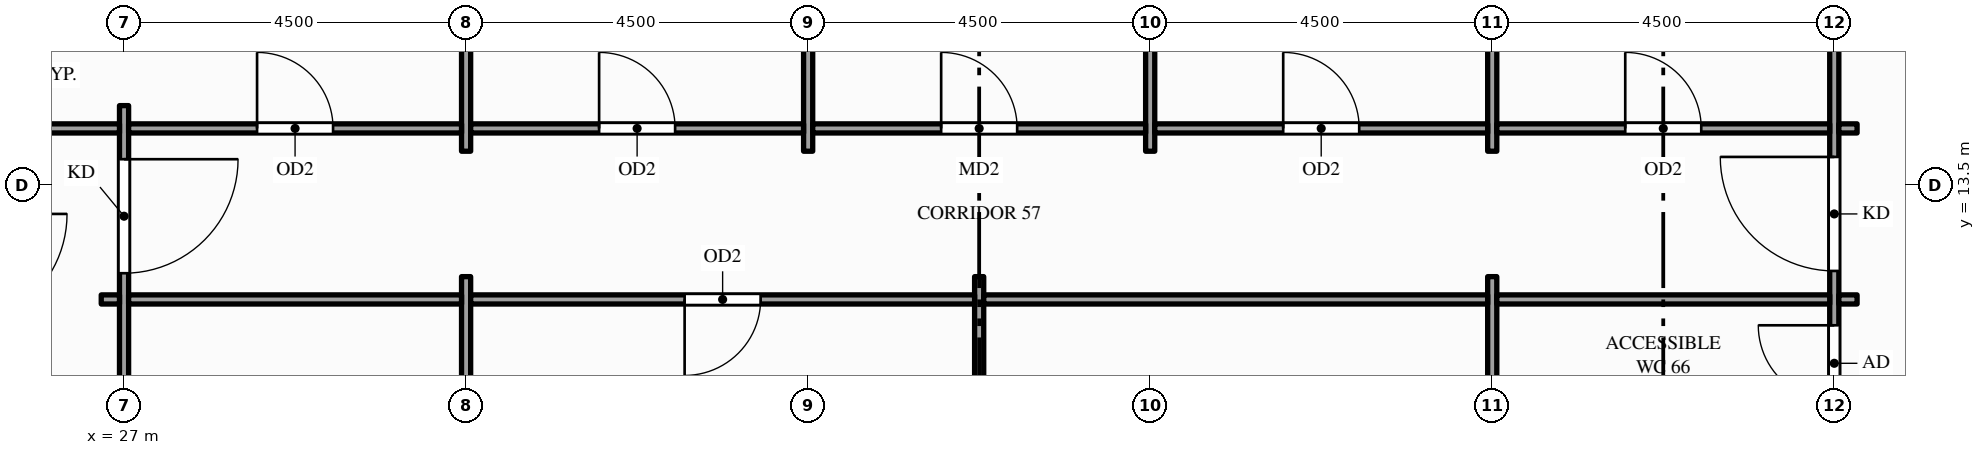
"""IFC4 building model, lengths in metres.
Left out: names, types, materials, properties, quantities, classifications, styles, units other than length and angle.
Written with IfcOpenShell. Run it as: python <this file> out.ifc"""

import sys

from ifc_helpers import new_model, si_unit, direction, frame, frame_2d, origin, place, context, subcontext, project, spatial, rectangle, extrude, element, fill, save


model = new_model("IFC4")
c1 = context("Model", 3, precision=1e-05, world=origin(), true_north=direction((0.0, 1.0)))
c2 = subcontext(c1, "Body", "Model", "MODEL_VIEW")
j1 = project(units=[si_unit("LENGTHUNIT", "METRE"), si_unit("PLANEANGLEUNIT", "RADIAN")], contexts=[c1])
p1 = place(None, origin())
s1 = spatial("IfcSite", under=j1, at=p1, CompositionType="ELEMENT")
p2 = place(p1, origin())
s2 = spatial("IfcBuilding", under=s1, at=p2, CompositionType="ELEMENT")
p3 = place(p2, frame((0.0, 0.0, 235.0)))
s3 = spatial("IfcBuildingStorey", under=s2, at=p3, CompositionType="ELEMENT", Elevation=235.0)
p4 = place(p3, frame((27.0, 4.95, 0.0), z_axis=(0.0, 0.0, 1.0), x_axis=(0.0, 1.0, 0.0)))
e1 = element("IfcWall", 1, at=p4, inside=s3, PredefinedType="PARTITIONING", context=c2, shape_type="SweptSolid", body=[
    extrude(rectangle(XDim=9.6, YDim=0.12, at=frame_2d((4.8, 0.0))), origin(), (0.0, 0.0, 1.0), 2.87),
])
p5 = place(p4, frame((0.705, 0.0, 0.0)))
e2 = element("IfcOpeningElement", 2, at=p5, cuts=e1, PredefinedType="OPENING", context=c2, shape_type="SweptSolid", body=[
    extrude(rectangle(XDim=1.5, YDim=2.1, at=frame_2d((0.75, 1.05))), frame((0.0, 0.07, 0.0), z_axis=(0.0, -1.0, 0.0), x_axis=(1.0, 0.0, 0.0)), (0.0, 0.0, 1.0), 0.14),
])
p6 = place(p4, frame((7.395, 0.0, 0.0)))
e3 = element("IfcOpeningElement", 3, at=p6, cuts=e1, PredefinedType="OPENING", context=c2, shape_type="SweptSolid", body=[
    extrude(rectangle(XDim=1.5, YDim=2.1, at=frame_2d((0.75, 1.05))), frame((0.0, 0.07, 0.0), z_axis=(0.0, -1.0, 0.0), x_axis=(1.0, 0.0, 0.0)), (0.0, 0.0, 1.0), 0.14),
])
p7 = place(p3, frame((31.5, 7.2, 0.0), z_axis=(0.0, 0.0, 1.0), x_axis=(0.0, 1.0, 0.0)))
e4 = element("IfcWall", 4, at=p7, inside=s3, PredefinedType="PARTITIONING", context=c2, shape_type="SweptSolid", body=[
    extrude(rectangle(XDim=5.1, YDim=0.12, at=frame_2d((2.55, 0.0))), origin(), (0.0, 0.0, 1.0), 2.87),
])
for number, where, z_axis, x_axis in (
    (5, (31.5, 13.95, 0.0), (0.0, 0.0, 1.0), (0.0, 1.0, 0.0)),
    (6, (36.0, 13.95, 0.0), (0.0, 0.0, 1.0), (0.0, 1.0, 0.0)),
):
    element("IfcWall", number, at=place(p3, frame(where, z_axis=z_axis, x_axis=x_axis)), inside=s3, PredefinedType="PARTITIONING", context=c2, shape_type="SweptSolid", body=[
        extrude(rectangle(XDim=6.9, YDim=0.12, at=frame_2d((3.45, 0.0))), origin(), (0.0, 0.0, 1.0), 2.87),
    ])
p8 = place(p3, frame((38.25, 7.2, 0.0), z_axis=(0.0, 0.0, 1.0), x_axis=(0.0, 1.0, 0.0)))
e7 = element("IfcWall", 7, at=p8, inside=s3, PredefinedType="PARTITIONING", context=c2, shape_type="SweptSolid", body=[
    extrude(rectangle(XDim=5.1, YDim=0.12, at=frame_2d((2.55, 0.0))), origin(), (0.0, 0.0, 1.0), 2.87),
])
p9 = place(p3, frame((40.5, 13.95, 0.0), z_axis=(0.0, 0.0, 1.0), x_axis=(0.0, 1.0, 0.0)))
e8 = element("IfcWall", 8, at=p9, inside=s3, PredefinedType="PARTITIONING", context=c2, shape_type="SweptSolid", body=[
    extrude(rectangle(XDim=6.9, YDim=0.12, at=frame_2d((3.45, 0.0))), origin(), (0.0, 0.0, 1.0), 2.87),
])
p10 = place(p3, frame((45.0, 7.2, 0.0), z_axis=(0.0, 0.0, 1.0), x_axis=(0.0, 1.0, 0.0)))
e9 = element("IfcWall", 9, at=p10, inside=s3, PredefinedType="PARTITIONING", context=c2, shape_type="SweptSolid", body=[
    extrude(rectangle(XDim=5.1, YDim=0.12, at=frame_2d((2.55, 0.0))), origin(), (0.0, 0.0, 1.0), 2.87),
])
p11 = place(p3, frame((45.0, 13.95, 0.0), z_axis=(0.0, 0.0, 1.0), x_axis=(0.0, 1.0, 0.0)))
e10 = element("IfcWall", 10, at=p11, inside=s3, PredefinedType="PARTITIONING", context=c2, shape_type="SweptSolid", body=[
    extrude(rectangle(XDim=6.9, YDim=0.12, at=frame_2d((3.45, 0.0))), origin(), (0.0, 0.0, 1.0), 2.87),
])
p12 = place(p3, frame((49.5, -1.35, 0.0), z_axis=(0.0, 0.0, 1.0), x_axis=(0.0, 1.0, 0.0)))
e11 = element("IfcWall", 11, at=p12, inside=s3, PredefinedType="PARTITIONING", context=c2, shape_type="SweptSolid", body=[
    extrude(rectangle(XDim=22.2, YDim=0.12, at=frame_2d((11.1, 0.0))), origin(), (0.0, 0.0, 1.0), 2.87),
])
p13 = place(p12, frame((6.975, 0.0, 0.0)))
e12 = element("IfcOpeningElement", 12, at=p13, cuts=e11, PredefinedType="OPENING", context=c2, shape_type="SweptSolid", body=[
    extrude(rectangle(XDim=1.5, YDim=2.1, at=frame_2d((0.75, 1.05))), frame((0.0, 0.07, 0.0), z_axis=(0.0, -1.0, 0.0), x_axis=(1.0, 0.0, 0.0)), (0.0, 0.0, 1.0), 0.14),
])
p14 = place(p12, frame((13.725, 0.0, 0.0)))
e13 = element("IfcOpeningElement", 13, at=p14, cuts=e11, PredefinedType="OPENING", context=c2, shape_type="SweptSolid", body=[
    extrude(rectangle(XDim=1.5, YDim=2.1, at=frame_2d((0.75, 1.05))), frame((0.0, 0.07, 0.0), z_axis=(0.0, -1.0, 0.0), x_axis=(1.0, 0.0, 0.0)), (0.0, 0.0, 1.0), 0.14),
])
p15 = place(p12, frame((9.29, 0.0, 0.0)))
e14 = element("IfcOpeningElement", 14, at=p15, cuts=e11, PredefinedType="OPENING", context=c2, shape_type="SweptSolid", body=[
    extrude(rectangle(XDim=0.9, YDim=2.1, at=frame_2d((0.45, 1.05))), frame((0.0, 0.07, 0.0), z_axis=(0.0, -1.0, 0.0), x_axis=(1.0, 0.0, 0.0)), (0.0, 0.0, 1.0), 0.14),
])
p16 = place(p12, frame((10.65, 0.0, 0.0)))
e15 = element("IfcOpeningElement", 15, at=p16, cuts=e11, PredefinedType="OPENING", context=c2, shape_type="SweptSolid", body=[
    extrude(rectangle(XDim=0.9, YDim=2.1, at=frame_2d((0.45, 1.05))), frame((0.0, 0.07, 0.0), z_axis=(0.0, -1.0, 0.0), x_axis=(1.0, 0.0, 0.0)), (0.0, 0.0, 1.0), 0.14),
])
p17 = place(p12, frame((12.01, 0.0, 0.0)))
e16 = element("IfcOpeningElement", 16, at=p17, cuts=e11, PredefinedType="OPENING", context=c2, shape_type="SweptSolid", body=[
    extrude(rectangle(XDim=1.0, YDim=2.1, at=frame_2d((0.5, 1.05))), frame((0.0, 0.07, 0.0), z_axis=(0.0, -1.0, 0.0), x_axis=(1.0, 0.0, 0.0)), (0.0, 0.0, 1.0), 0.14),
])
p18 = place(p3, frame((26.7, 12.0, 0.0), z_axis=(0.0, 0.0, 1.0), x_axis=(1.0, 0.0, 0.0)))
e17 = element("IfcWall", 17, at=p18, inside=s3, PredefinedType="PARTITIONING", context=c2, shape_type="SweptSolid", body=[
    extrude(rectangle(XDim=0.24, YDim=0.12, at=frame_2d((0.12, 0.0))), origin(), (0.0, 0.0, 1.0), 2.87),
])
p19 = place(p3, frame((27.06, 12.0, 0.0), z_axis=(0.0, 0.0, 1.0), x_axis=(1.0, 0.0, 0.0)))
e18 = element("IfcWall", 18, at=p19, inside=s3, PredefinedType="PARTITIONING", context=c2, shape_type="SweptSolid", body=[
    extrude(rectangle(XDim=4.38, YDim=0.12, at=frame_2d((2.19, 0.0))), origin(), (0.0, 0.0, 1.0), 2.87),
])
p20 = place(p3, frame((31.56, 12.0, 0.0), z_axis=(0.0, 0.0, 1.0), x_axis=(1.0, 0.0, 0.0)))
e19 = element("IfcWall", 19, at=p20, inside=s3, PredefinedType="PARTITIONING", context=c2, shape_type="SweptSolid", body=[
    extrude(rectangle(XDim=6.63, YDim=0.12, at=frame_2d((3.315, 0.0))), origin(), (0.0, 0.0, 1.0), 2.87),
])
p21 = place(p20, frame((2.815, 0.0, 0.0)))
e20 = element("IfcOpeningElement", 20, at=p21, cuts=e19, PredefinedType="OPENING", context=c2, shape_type="SweptSolid", body=[
    extrude(rectangle(XDim=1.0, YDim=2.1, at=frame_2d((0.5, 1.05))), frame((0.0, 0.07, 0.0), z_axis=(0.0, -1.0, 0.0), x_axis=(1.0, 0.0, 0.0)), (0.0, 0.0, 1.0), 0.14),
])
p22 = place(p3, frame((38.31, 12.0, 0.0), z_axis=(0.0, 0.0, 1.0), x_axis=(1.0, 0.0, 0.0)))
e21 = element("IfcWall", 21, at=p22, inside=s3, PredefinedType="PARTITIONING", context=c2, shape_type="SweptSolid", body=[
    extrude(rectangle(XDim=6.63, YDim=0.12, at=frame_2d((3.315, 0.0))), origin(), (0.0, 0.0, 1.0), 2.87),
])
p23 = place(p3, frame((45.06, 12.0, 0.0), z_axis=(0.0, 0.0, 1.0), x_axis=(1.0, 0.0, 0.0)))
e22 = element("IfcWall", 22, at=p23, inside=s3, PredefinedType="PARTITIONING", context=c2, shape_type="SweptSolid", body=[
    extrude(rectangle(XDim=4.38, YDim=0.12, at=frame_2d((2.19, 0.0))), origin(), (0.0, 0.0, 1.0), 2.87),
])
p24 = place(p3, frame((49.56, 12.0, 0.0), z_axis=(0.0, 0.0, 1.0), x_axis=(1.0, 0.0, 0.0)))
e23 = element("IfcWall", 23, at=p24, inside=s3, PredefinedType="PARTITIONING", context=c2, shape_type="SweptSolid", body=[
    extrude(rectangle(XDim=0.24, YDim=0.12, at=frame_2d((0.12, 0.0))), origin(), (0.0, 0.0, 1.0), 2.87),
])
p25 = place(p3, frame((24.81, 14.25, 0.0), z_axis=(0.0, 0.0, 1.0), x_axis=(1.0, 0.0, 0.0)))
e24 = element("IfcWall", 24, at=p25, inside=s3, PredefinedType="PARTITIONING", context=c2, shape_type="SweptSolid", body=[
    extrude(rectangle(XDim=2.13, YDim=0.12, at=frame_2d((1.065, 0.0))), origin(), (0.0, 0.0, 1.0), 2.76),
])
p26 = place(p3, frame((27.06, 14.25, 0.0), z_axis=(0.0, 0.0, 1.0), x_axis=(1.0, 0.0, 0.0)))
e25 = element("IfcWall", 25, at=p26, inside=s3, PredefinedType="PARTITIONING", context=c2, shape_type="SweptSolid", body=[
    extrude(rectangle(XDim=4.38, YDim=0.12, at=frame_2d((2.19, 0.0))), origin(), (0.0, 0.0, 1.0), 2.87),
])
p27 = place(p26, frame((1.69, 0.0, 0.0)))
e26 = element("IfcOpeningElement", 26, at=p27, cuts=e25, PredefinedType="OPENING", context=c2, shape_type="SweptSolid", body=[
    extrude(rectangle(XDim=1.0, YDim=2.1, at=frame_2d((0.5, 1.05))), frame((0.0, 0.07, 0.0), z_axis=(0.0, -1.0, 0.0), x_axis=(1.0, 0.0, 0.0)), (0.0, 0.0, 1.0), 0.14),
])
p28 = place(p3, frame((31.56, 14.25, 0.0), z_axis=(0.0, 0.0, 1.0), x_axis=(1.0, 0.0, 0.0)))
e27 = element("IfcWall", 27, at=p28, inside=s3, PredefinedType="PARTITIONING", context=c2, shape_type="SweptSolid", body=[
    extrude(rectangle(XDim=4.38, YDim=0.12, at=frame_2d((2.19, 0.0))), origin(), (0.0, 0.0, 1.0), 2.87),
])
p29 = place(p28, frame((1.69, 0.0, 0.0)))
e28 = element("IfcOpeningElement", 28, at=p29, cuts=e27, PredefinedType="OPENING", context=c2, shape_type="SweptSolid", body=[
    extrude(rectangle(XDim=1.0, YDim=2.1, at=frame_2d((0.5, 1.05))), frame((0.0, 0.07, 0.0), z_axis=(0.0, -1.0, 0.0), x_axis=(1.0, 0.0, 0.0)), (0.0, 0.0, 1.0), 0.14),
])
p30 = place(p3, frame((36.06, 14.25, 0.0), z_axis=(0.0, 0.0, 1.0), x_axis=(1.0, 0.0, 0.0)))
e29 = element("IfcWall", 29, at=p30, inside=s3, PredefinedType="PARTITIONING", context=c2, shape_type="SweptSolid", body=[
    extrude(rectangle(XDim=4.38, YDim=0.12, at=frame_2d((2.19, 0.0))), origin(), (0.0, 0.0, 1.0), 2.87),
])
p31 = place(p30, frame((1.69, 0.0, 0.0)))
e30 = element("IfcOpeningElement", 30, at=p31, cuts=e29, PredefinedType="OPENING", context=c2, shape_type="SweptSolid", body=[
    extrude(rectangle(XDim=1.0, YDim=2.1, at=frame_2d((0.5, 1.05))), frame((0.0, 0.07, 0.0), z_axis=(0.0, -1.0, 0.0), x_axis=(1.0, 0.0, 0.0)), (0.0, 0.0, 1.0), 0.14),
])
p32 = place(p3, frame((40.56, 14.25, 0.0), z_axis=(0.0, 0.0, 1.0), x_axis=(1.0, 0.0, 0.0)))
e31 = element("IfcWall", 31, at=p32, inside=s3, PredefinedType="PARTITIONING", context=c2, shape_type="SweptSolid", body=[
    extrude(rectangle(XDim=4.38, YDim=0.12, at=frame_2d((2.19, 0.0))), origin(), (0.0, 0.0, 1.0), 2.87),
])
p33 = place(p32, frame((1.69, 0.0, 0.0)))
e32 = element("IfcOpeningElement", 32, at=p33, cuts=e31, PredefinedType="OPENING", context=c2, shape_type="SweptSolid", body=[
    extrude(rectangle(XDim=1.0, YDim=2.1, at=frame_2d((0.5, 1.05))), frame((0.0, 0.07, 0.0), z_axis=(0.0, -1.0, 0.0), x_axis=(1.0, 0.0, 0.0)), (0.0, 0.0, 1.0), 0.14),
])
p34 = place(p3, frame((45.06, 14.25, 0.0), z_axis=(0.0, 0.0, 1.0), x_axis=(1.0, 0.0, 0.0)))
e33 = element("IfcWall", 33, at=p34, inside=s3, PredefinedType="PARTITIONING", context=c2, shape_type="SweptSolid", body=[
    extrude(rectangle(XDim=4.38, YDim=0.12, at=frame_2d((2.19, 0.0))), origin(), (0.0, 0.0, 1.0), 2.87),
])
p35 = place(p34, frame((1.69, 0.0, 0.0)))
e34 = element("IfcOpeningElement", 34, at=p35, cuts=e33, PredefinedType="OPENING", context=c2, shape_type="SweptSolid", body=[
    extrude(rectangle(XDim=1.0, YDim=2.1, at=frame_2d((0.5, 1.05))), frame((0.0, 0.07, 0.0), z_axis=(0.0, -1.0, 0.0), x_axis=(1.0, 0.0, 0.0)), (0.0, 0.0, 1.0), 0.14),
])
p36 = place(p3, frame((49.56, 14.25, 0.0), z_axis=(0.0, 0.0, 1.0), x_axis=(1.0, 0.0, 0.0)))
e35 = element("IfcWall", 35, at=p36, inside=s3, PredefinedType="PARTITIONING", context=c2, shape_type="SweptSolid", body=[
    extrude(rectangle(XDim=0.24, YDim=0.12, at=frame_2d((0.12, 0.0))), origin(), (0.0, 0.0, 1.0), 2.87),
])
p37 = place(p6, origin())
e36 = element("IfcDoor", 36, at=p37, inside=s3, OperationType="SINGLE_SWING_RIGHT", PredefinedType="DOOR", context=c2, shape_type="SweptSolid", body=[
    extrude(rectangle(XDim=1.5, YDim=2.1, at=frame_2d((0.75, 1.05))), frame((0.0, 0.025, 0.0), z_axis=(0.0, -1.0, 0.0), x_axis=(1.0, 0.0, 0.0)), (0.0, 0.0, 1.0), 0.05),
])
fill(e3, e36)
p38 = place(p14, origin())
e37 = element("IfcDoor", 37, at=p38, inside=s3, OperationType="SINGLE_SWING_RIGHT", PredefinedType="DOOR", context=c2, shape_type="SweptSolid", body=[
    extrude(rectangle(XDim=1.5, YDim=2.1, at=frame_2d((0.75, 1.05))), frame((0.0, 0.025, 0.0), z_axis=(0.0, -1.0, 0.0), x_axis=(1.0, 0.0, 0.0)), (0.0, 0.0, 1.0), 0.05),
])
fill(e13, e37)
p39 = place(p21, origin())
e38 = element("IfcDoor", 38, at=p39, inside=s3, OperationType="SINGLE_SWING_LEFT", PredefinedType="DOOR", context=c2, shape_type="SweptSolid", body=[
    extrude(rectangle(XDim=1.0, YDim=2.1, at=frame_2d((0.5, 1.05))), frame((0.0, 0.025, 0.0), z_axis=(0.0, -1.0, 0.0), x_axis=(1.0, 0.0, 0.0)), (0.0, 0.0, 1.0), 0.05),
])
fill(e20, e38)
p40 = place(p17, origin())
e39 = element("IfcDoor", 39, at=p40, inside=s3, OperationType="SINGLE_SWING_RIGHT", PredefinedType="DOOR", context=c2, shape_type="SweptSolid", body=[
    extrude(rectangle(XDim=1.0, YDim=2.1, at=frame_2d((0.5, 1.05))), frame((0.0, 0.025, 0.0), z_axis=(0.0, -1.0, 0.0), x_axis=(1.0, 0.0, 0.0)), (0.0, 0.0, 1.0), 0.05),
])
fill(e16, e39)
p41 = place(p27, origin())
e40 = element("IfcDoor", 40, at=p41, inside=s3, OperationType="SINGLE_SWING_LEFT", PredefinedType="DOOR", context=c2, shape_type="SweptSolid", body=[
    extrude(rectangle(XDim=1.0, YDim=2.1, at=frame_2d((0.5, 1.05))), frame((0.0, 0.025, 0.0), z_axis=(0.0, -1.0, 0.0), x_axis=(1.0, 0.0, 0.0)), (0.0, 0.0, 1.0), 0.05),
])
fill(e26, e40)
p42 = place(p29, origin())
e41 = element("IfcDoor", 41, at=p42, inside=s3, OperationType="SINGLE_SWING_LEFT", PredefinedType="DOOR", context=c2, shape_type="SweptSolid", body=[
    extrude(rectangle(XDim=1.0, YDim=2.1, at=frame_2d((0.5, 1.05))), frame((0.0, 0.025, 0.0), z_axis=(0.0, -1.0, 0.0), x_axis=(1.0, 0.0, 0.0)), (0.0, 0.0, 1.0), 0.05),
])
fill(e28, e41)
p43 = place(p31, origin())
e42 = element("IfcDoor", 42, at=p43, inside=s3, OperationType="SINGLE_SWING_LEFT", PredefinedType="DOOR", context=c2, shape_type="SweptSolid", body=[
    extrude(rectangle(XDim=1.0, YDim=2.1, at=frame_2d((0.5, 1.05))), frame((0.0, 0.025, 0.0), z_axis=(0.0, -1.0, 0.0), x_axis=(1.0, 0.0, 0.0)), (0.0, 0.0, 1.0), 0.05),
])
fill(e30, e42)
p44 = place(p33, origin())
e43 = element("IfcDoor", 43, at=p44, inside=s3, OperationType="SINGLE_SWING_LEFT", PredefinedType="DOOR", context=c2, shape_type="SweptSolid", body=[
    extrude(rectangle(XDim=1.0, YDim=2.1, at=frame_2d((0.5, 1.05))), frame((0.0, 0.025, 0.0), z_axis=(0.0, -1.0, 0.0), x_axis=(1.0, 0.0, 0.0)), (0.0, 0.0, 1.0), 0.05),
])
fill(e32, e43)
p45 = place(p35, origin())
e44 = element("IfcDoor", 44, at=p45, inside=s3, OperationType="SINGLE_SWING_LEFT", PredefinedType="DOOR", context=c2, shape_type="SweptSolid", body=[
    extrude(rectangle(XDim=1.0, YDim=2.1, at=frame_2d((0.5, 1.05))), frame((0.0, 0.025, 0.0), z_axis=(0.0, -1.0, 0.0), x_axis=(1.0, 0.0, 0.0)), (0.0, 0.0, 1.0), 0.05),
])
fill(e34, e44)
save(model, sys.argv[1])
